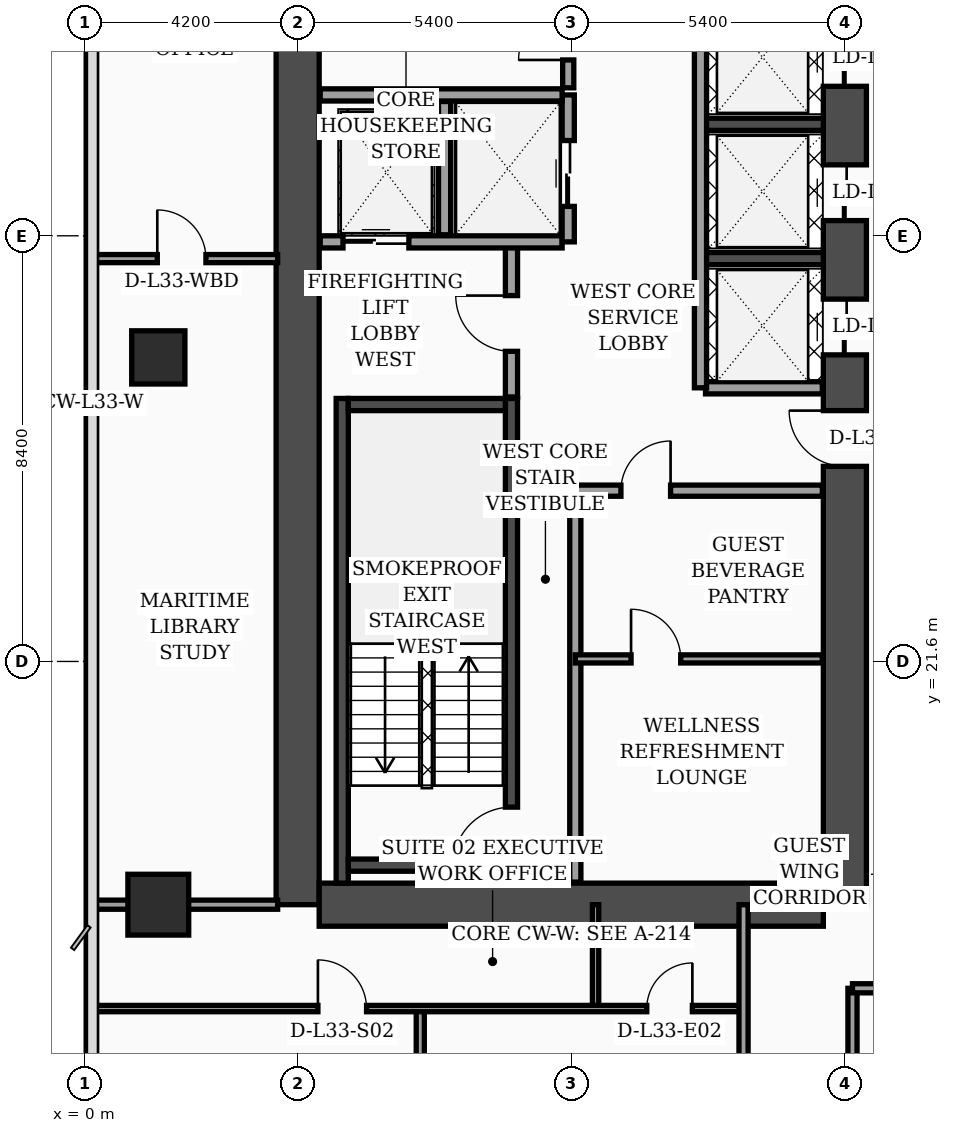
"""IFC4 building model, lengths in metres.
Left out: names, types, materials, properties, quantities, classifications, styles, units other than length and angle.
Written with IfcOpenShell. Run it as: python <this file> out.ifc"""

import sys

from ifc_helpers import new_model, si_unit, direction, frame, frame_2d, origin, origin_2d, place, context, subcontext, project, spatial, rectangle, extrude, element, fill, save


model = new_model("IFC4")
c1 = context("Model", 3, precision=1e-05, world=origin(), true_north=direction((0.0, 1.0)))
c2 = subcontext(c1, "Body", "Model", "MODEL_VIEW")
j1 = project(units=[si_unit("LENGTHUNIT", "METRE"), si_unit("PLANEANGLEUNIT", "RADIAN")], contexts=[c1])
p1 = place(None, origin())
s1 = spatial("IfcSite", under=j1, at=p1, CompositionType="ELEMENT")
p2 = place(p1, origin())
s2 = spatial("IfcBuilding", under=s1, at=p2, CompositionType="ELEMENT")
p3 = place(p2, frame((0.0, 0.0, 135.4)))
s3 = spatial("IfcBuildingStorey", under=s2, at=p3, CompositionType="ELEMENT", Elevation=135.4)
p4 = place(p3, frame((4.2, 16.8, 0.0), z_axis=(0.0, 0.0, 1.0), x_axis=(0.0, 1.0, 0.0)))
e1 = element("IfcWall", 1, at=p4, inside=s3, PredefinedType="SHEAR", context=c2, shape_type="SweptSolid", body=[
    extrude(rectangle(XDim=21.6, YDim=0.85, at=frame_2d((10.8, 0.0))), origin(), (0.0, 0.0, 1.0), 3.52),
])
p5 = place(p3, frame((15.0, 16.8, 0.0), z_axis=(0.0, 0.0, 1.0), x_axis=(0.0, 1.0, 0.0)))
e2 = element("IfcWall", 2, at=p5, inside=s3, PredefinedType="SHEAR", context=c2, shape_type="SweptSolid", body=[
    extrude(rectangle(XDim=21.6, YDim=0.85, at=frame_2d((10.8, 0.0))), origin(), (0.0, 0.0, 1.0), 3.52),
])
p6 = place(p5, frame((8.65, 0.0, 0.0)))
e3 = element("IfcOpeningElement", 3, at=p6, cuts=e2, PredefinedType="OPENING", context=c2, shape_type="SweptSolid", body=[
    extrude(rectangle(XDim=1.1, YDim=2.2, at=frame_2d((0.55, 1.1))), frame((0.0, 0.435, 0.0), z_axis=(0.0, -1.0, 0.0), x_axis=(1.0, 0.0, 0.0)), (0.0, 0.0, 1.0), 0.87),
])
p7 = place(p5, frame((10.85, 0.0, 0.0)))
e4 = element("IfcOpeningElement", 4, at=p7, cuts=e2, PredefinedType="OPENING", context=c2, shape_type="SweptSolid", body=[
    extrude(rectangle(XDim=1.1, YDim=2.2, at=frame_2d((0.55, 1.1))), frame((0.0, 0.435, 0.0), z_axis=(0.0, -1.0, 0.0), x_axis=(1.0, 0.0, 0.0)), (0.0, 0.0, 1.0), 0.87),
])
p8 = place(p5, frame((13.5, 0.0, 0.0)))
e5 = element("IfcOpeningElement", 5, at=p8, cuts=e2, PredefinedType="OPENING", context=c2, shape_type="SweptSolid", body=[
    extrude(rectangle(XDim=1.1, YDim=2.2, at=frame_2d((0.55, 1.1))), frame((0.0, 0.435, 0.0), z_axis=(0.0, -1.0, 0.0), x_axis=(1.0, 0.0, 0.0)), (0.0, 0.0, 1.0), 0.87),
])
p9 = place(p5, frame((16.15, 0.0, 0.0)))
e6 = element("IfcOpeningElement", 6, at=p9, cuts=e2, PredefinedType="OPENING", context=c2, shape_type="SweptSolid", body=[
    extrude(rectangle(XDim=1.1, YDim=2.2, at=frame_2d((0.55, 1.1))), frame((0.0, 0.435, 0.0), z_axis=(0.0, -1.0, 0.0), x_axis=(1.0, 0.0, 0.0)), (0.0, 0.0, 1.0), 0.87),
])
p10 = place(p3, frame((4.625, 16.8, 0.0), z_axis=(0.0, 0.0, 1.0), x_axis=(1.0, 0.0, 0.0)))
e7 = element("IfcWall", 7, at=p10, inside=s3, PredefinedType="SHEAR", context=c2, shape_type="SweptSolid", body=[
    extrude(rectangle(XDim=9.95, YDim=0.85, at=frame_2d((4.975, 0.0))), origin(), (0.0, 0.0, 1.0), 3.52),
])
p11 = place(p3, frame((5.08, 17.225, 0.0), z_axis=(0.0, 0.0, 1.0), x_axis=(0.0, 1.0, 0.0)))
e8 = element("IfcWall", 8, at=p11, inside=s3, PredefinedType="SOLIDWALL", context=c2, shape_type="SweptSolid", body=[
    extrude(rectangle(XDim=9.565, YDim=0.24, at=frame_2d((4.782, 0.0))), origin(), (0.0, 0.0, 1.0), 3.52),
])
p12 = place(p3, frame((8.42, 17.225, 0.0), z_axis=(0.0, 0.0, 1.0), x_axis=(0.0, 1.0, 0.0)))
e9 = element("IfcWall", 9, at=p12, inside=s3, PredefinedType="SOLIDWALL", context=c2, shape_type="SweptSolid", body=[
    extrude(rectangle(XDim=9.565, YDim=0.24, at=frame_2d((4.782, 0.0))), origin(), (0.0, 0.0, 1.0), 3.52),
])
p13 = place(p12, frame((0.35, 0.0, 0.0)))
e10 = element("IfcOpeningElement", 10, at=p13, cuts=e9, PredefinedType="OPENING", context=c2, shape_type="SweptSolid", body=[
    extrude(rectangle(XDim=1.15, YDim=2.2, at=frame_2d((0.575, 1.1))), frame((0.0, 0.13, 0.0), z_axis=(0.0, -1.0, 0.0), x_axis=(1.0, 0.0, 0.0)), (0.0, 0.0, 1.0), 0.26),
])
for number, where, z_axis, x_axis in (
    (11, (5.2, 17.58, 0.0), (0.0, 0.0, 1.0), (1.0, 0.0, 0.0)),
    (12, (5.2, 26.67, 0.0), (0.0, 0.0, 1.0), (1.0, 0.0, 0.0)),
):
    element("IfcWall", number, at=place(p3, frame(where, z_axis=z_axis, x_axis=x_axis)), inside=s3, PredefinedType="SOLIDWALL", context=c2, shape_type="SweptSolid", body=[
        extrude(rectangle(XDim=3.1, YDim=0.24, at=frame_2d((1.55, 0.0))), origin(), (0.0, 0.0, 1.0), 3.52),
    ])
for number, where, z_axis, x_axis in (
    (13, (12.18, 29.55, 0.0), (0.0, 0.0, 1.0), (1.0, 0.0, 0.0)),
    (14, (12.18, 32.2, 0.0), (0.0, 0.0, 1.0), (1.0, 0.0, 0.0)),
):
    element("IfcWall", number, at=place(p3, frame(where, z_axis=z_axis, x_axis=x_axis)), inside=s3, PredefinedType="SOLIDWALL", context=c2, shape_type="SweptSolid", body=[
        extrude(rectangle(XDim=2.395, YDim=0.24, at=frame_2d((1.198, 0.0))), origin(), (0.0, 0.0, 1.0), 3.52),
    ])
p14 = place(p3, frame((1.45, 16.8, 0.0), z_axis=(0.0, 0.0, 1.0), x_axis=(1.0, 0.0, 0.0)))
e15 = element("IfcColumn", 15, at=p14, inside=s3, PredefinedType="COLUMN", context=c2, shape_type="SweptSolid", body=[
    extrude(rectangle(XDim=1.2, YDim=1.2, at=origin_2d()), origin(), (0.0, 0.0, 1.0), 3.52),
])
p15 = place(p3, frame((1.45, 27.6, 0.0), z_axis=(0.0, 0.0, 1.0), x_axis=(1.0, 0.0, 0.0)))
e16 = element("IfcColumn", 16, at=p15, inside=s3, PredefinedType="COLUMN", context=c2, shape_type="SweptSolid", body=[
    extrude(rectangle(XDim=1.05, YDim=1.05, at=origin_2d()), origin(), (0.0, 0.0, 1.0), 3.52),
])
p16 = place(p3, frame((8.42, 26.82, 0.0), z_axis=(0.0, 0.0, 1.0), x_axis=(0.0, 1.0, 0.0)))
e17 = element("IfcWall", 17, at=p16, inside=s3, PredefinedType="SOLIDWALL", context=c2, shape_type="SweptSolid", body=[
    extrude(rectangle(XDim=3.0, YDim=0.24, at=frame_2d((1.5, 0.0))), origin(), (0.0, 0.0, 1.0), 3.52),
])
p17 = place(p16, frame((0.9, 0.0, 0.0)))
e18 = element("IfcOpeningElement", 18, at=p17, cuts=e17, PredefinedType="OPENING", context=c2, shape_type="SweptSolid", body=[
    extrude(rectangle(XDim=1.1, YDim=2.2, at=frame_2d((0.55, 1.1))), frame((0.0, 0.13, 0.0), z_axis=(0.0, -1.0, 0.0), x_axis=(1.0, 0.0, 0.0)), (0.0, 0.0, 1.0), 0.26),
])
p18 = place(p3, frame((4.645, 29.88, 0.0), z_axis=(0.0, 0.0, 1.0), x_axis=(1.0, 0.0, 0.0)))
e19 = element("IfcWall", 19, at=p18, inside=s3, PredefinedType="SOLIDWALL", context=c2, shape_type="SweptSolid", body=[
    extrude(rectangle(XDim=4.775, YDim=0.24, at=frame_2d((2.387, 0.0))), origin(), (0.0, 0.0, 1.0), 3.52),
])
p19 = place(p18, frame((0.45, 0.0, 0.0)))
e20 = element("IfcOpeningElement", 20, at=p19, cuts=e19, PredefinedType="OPENING", context=c2, shape_type="SweptSolid", body=[
    extrude(rectangle(XDim=1.3, YDim=2.35, at=frame_2d((0.65, 1.175))), frame((0.0, 0.13, 0.0), z_axis=(0.0, -1.0, 0.0), x_axis=(1.0, 0.0, 0.0)), (0.0, 0.0, 1.0), 0.26),
])
p20 = place(p3, frame((7.1, 30.02, 0.0), z_axis=(0.0, 0.0, 1.0), x_axis=(0.0, 1.0, 0.0)))
e21 = element("IfcWall", 21, at=p20, inside=s3, PredefinedType="SOLIDWALL", context=c2, shape_type="SweptSolid", body=[
    extrude(rectangle(XDim=2.63, YDim=0.24, at=frame_2d((1.315, 0.0))), origin(), (0.0, 0.0, 1.0), 3.52),
])
p21 = place(p3, frame((9.54, 29.88, 0.0), z_axis=(0.0, 0.0, 1.0), x_axis=(0.0, 1.0, 0.0)))
e22 = element("IfcWall", 22, at=p21, inside=s3, PredefinedType="SOLIDWALL", context=c2, shape_type="SweptSolid", body=[
    extrude(rectangle(XDim=2.9, YDim=0.24, at=frame_2d((1.45, 0.0))), origin(), (0.0, 0.0, 1.0), 3.52),
])
p22 = place(p21, frame((0.7, 0.0, 0.0)))
e23 = element("IfcOpeningElement", 23, at=p22, cuts=e22, PredefinedType="OPENING", context=c2, shape_type="SweptSolid", body=[
    extrude(rectangle(XDim=1.3, YDim=2.35, at=frame_2d((0.65, 1.175))), frame((0.0, 0.13, 0.0), z_axis=(0.0, -1.0, 0.0), x_axis=(1.0, 0.0, 0.0)), (0.0, 0.0, 1.0), 0.26),
])
p23 = place(p3, frame((4.645, 32.78, 0.0), z_axis=(0.0, 0.0, 1.0), x_axis=(1.0, 0.0, 0.0)))
e24 = element("IfcWall", 24, at=p23, inside=s3, PredefinedType="SOLIDWALL", context=c2, shape_type="SweptSolid", body=[
    extrude(rectangle(XDim=4.775, YDim=0.24, at=frame_2d((2.387, 0.0))), origin(), (0.0, 0.0, 1.0), 3.17),
])
p24 = place(p3, frame((9.68, 17.245, 0.0), z_axis=(0.0, 0.0, 1.0), x_axis=(0.0, 1.0, 0.0)))
e25 = element("IfcWall", 25, at=p24, inside=s3, PredefinedType="SOLIDWALL", context=c2, shape_type="SweptSolid", body=[
    extrude(rectangle(XDim=7.755, YDim=0.22, at=frame_2d((3.877, 0.0))), origin(), (0.0, 0.0, 1.0), 3.52),
])
p25 = place(p3, frame((9.54, 32.92, 0.0), z_axis=(0.0, 0.0, 1.0), x_axis=(0.0, 1.0, 0.0)))
e26 = element("IfcWall", 26, at=p25, inside=s3, PredefinedType="SOLIDWALL", context=c2, shape_type="SweptSolid", body=[
    extrude(rectangle(XDim=5.035, YDim=0.22, at=frame_2d((2.518, 0.0))), origin(), (0.0, 0.0, 1.0), 3.52),
])
p26 = place(p25, frame((0.55, 0.0, 0.0)))
e27 = element("IfcOpeningElement", 27, at=p26, cuts=e26, PredefinedType="OPENING", context=c2, shape_type="SweptSolid", body=[
    extrude(rectangle(XDim=0.98, YDim=2.15, at=frame_2d((0.49, 1.075))), frame((0.0, 0.12, 0.0), z_axis=(0.0, -1.0, 0.0), x_axis=(1.0, 0.0, 0.0)), (0.0, 0.0, 1.0), 0.24),
])
p27 = place(p3, frame((9.68, 21.65, 0.0), z_axis=(0.0, 0.0, 1.0), x_axis=(1.0, 0.0, 0.0)))
e28 = element("IfcWall", 28, at=p27, inside=s3, PredefinedType="PARTITIONING", context=c2, shape_type="SweptSolid", body=[
    extrude(rectangle(XDim=4.875, YDim=0.16, at=frame_2d((2.438, 0.0))), origin(), (0.0, 0.0, 1.0), 3.52),
])
p28 = place(p27, frame((1.1, 0.0, 0.0)))
e29 = element("IfcOpeningElement", 29, at=p28, cuts=e28, PredefinedType="OPENING", context=c2, shape_type="SweptSolid", body=[
    extrude(rectangle(XDim=0.98, YDim=2.15, at=frame_2d((0.49, 1.075))), frame((0.0, 0.09, 0.0), z_axis=(0.0, -1.0, 0.0), x_axis=(1.0, 0.0, 0.0)), (0.0, 0.0, 1.0), 0.18),
])
p29 = place(p3, frame((9.68, 24.97, 0.0), z_axis=(0.0, 0.0, 1.0), x_axis=(1.0, 0.0, 0.0)))
e30 = element("IfcWall", 30, at=p29, inside=s3, PredefinedType="SOLIDWALL", context=c2, shape_type="SweptSolid", body=[
    extrude(rectangle(XDim=4.875, YDim=0.22, at=frame_2d((2.438, 0.0))), origin(), (0.0, 0.0, 1.0), 2.82),
])
p30 = place(p29, frame((0.9, 0.0, 0.0)))
e31 = element("IfcOpeningElement", 31, at=p30, cuts=e30, PredefinedType="OPENING", context=c2, shape_type="SweptSolid", body=[
    extrude(rectangle(XDim=0.98, YDim=2.15, at=frame_2d((0.49, 1.075))), frame((0.0, 0.12, 0.0), z_axis=(0.0, -1.0, 0.0), x_axis=(1.0, 0.0, 0.0)), (0.0, 0.0, 1.0), 0.24),
])
p31 = place(p3, frame((12.25, 27.0, 0.0), z_axis=(0.0, 0.0, 1.0), x_axis=(1.0, 0.0, 0.0)))
e32 = element("IfcWall", 32, at=p31, inside=s3, PredefinedType="SOLIDWALL", context=c2, shape_type="SweptSolid", body=[
    extrude(rectangle(XDim=2.305, YDim=0.24, at=frame_2d((1.152, 0.0))), origin(), (0.0, 0.0, 1.0), 3.52),
])
p32 = place(p3, frame((12.15, 27.0, 0.0), z_axis=(0.0, 0.0, 1.0), x_axis=(0.0, 1.0, 0.0)))
e33 = element("IfcWall", 33, at=p32, inside=s3, PredefinedType="SOLIDWALL", context=c2, shape_type="SweptSolid", body=[
    extrude(rectangle(XDim=7.75, YDim=0.24, at=frame_2d((3.875, 0.0))), origin(), (0.0, 0.0, 1.0), 3.52),
])
p33 = place(p3, frame((0.08, 29.55, 0.0), z_axis=(0.0, 0.0, 1.0), x_axis=(1.0, 0.0, 0.0)))
e34 = element("IfcWall", 34, at=p33, inside=s3, PredefinedType="PARTITIONING", context=c2, shape_type="SweptSolid", body=[
    extrude(rectangle(XDim=3.725, YDim=0.16, at=frame_2d((1.862, 0.0))), origin(), (0.0, 0.0, 1.0), 3.02),
])
p34 = place(p33, frame((1.35, 0.0, 0.0)))
e35 = element("IfcOpeningElement", 35, at=p34, cuts=e34, PredefinedType="OPENING", context=c2, shape_type="SweptSolid", body=[
    extrude(rectangle(XDim=0.96, YDim=2.2, at=frame_2d((0.48, 1.1))), frame((0.0, 0.09, 0.0), z_axis=(0.0, -1.0, 0.0), x_axis=(1.0, 0.0, 0.0)), (0.0, 0.0, 1.0), 0.18),
])
p35 = place(p3, frame((0.08, 16.8, 0.0), z_axis=(0.0, 0.0, 1.0), x_axis=(1.0, 0.0, 0.0)))
e36 = element("IfcWall", 36, at=p35, inside=s3, PredefinedType="PARTITIONING", context=c2, shape_type="SweptSolid", body=[
    extrude(rectangle(XDim=3.725, YDim=0.18, at=frame_2d((1.862, 0.0))), origin(), (0.0, 0.0, 1.0), 2.82),
])
p36 = place(p3, frame((10.08, 14.75, 0.0), z_axis=(0.0, 0.0, 1.0), x_axis=(0.0, 1.0, 0.0)))
e37 = element("IfcWall", 37, at=p36, inside=s3, PredefinedType="PARTITIONING", context=c2, shape_type="SweptSolid", body=[
    extrude(rectangle(XDim=2.05, YDim=0.125, at=frame_2d((1.025, 0.0))), origin(), (0.0, 0.0, 1.0), 3.52),
])
p37 = place(p3, frame((6.62, 10.2, 0.0), z_axis=(0.0, 0.0, 1.0), x_axis=(0.0, 1.0, 0.0)))
e38 = element("IfcWall", 38, at=p37, inside=s3, PredefinedType="PARTITIONING", context=c2, shape_type="SweptSolid", body=[
    extrude(rectangle(XDim=4.55, YDim=0.16, at=frame_2d((2.275, 0.0))), origin(), (0.0, 0.0, 1.0), 3.12),
])
p38 = place(p37, frame((1.8, 0.0, 0.0)))
e39 = element("IfcOpeningElement", 39, at=p38, cuts=e38, PredefinedType="OPENING", context=c2, shape_type="SweptSolid", body=[
    extrude(rectangle(XDim=0.96, YDim=2.2, at=frame_2d((0.48, 1.1))), frame((0.0, 0.09, 0.0), z_axis=(0.0, -1.0, 0.0), x_axis=(1.0, 0.0, 0.0)), (0.0, 0.0, 1.0), 0.18),
])
p39 = place(p3, frame((0.08, 14.75, 0.0), z_axis=(0.0, 0.0, 1.0), x_axis=(1.0, 0.0, 0.0)))
e40 = element("IfcWall", 40, at=p39, inside=s3, PredefinedType="PARTITIONING", context=c2, shape_type="SweptSolid", body=[
    extrude(rectangle(XDim=12.92, YDim=0.125, at=frame_2d((6.46, 0.0))), origin(), (0.0, 0.0, 1.0), 2.82),
])
p40 = place(p39, frame((4.52, 0.0, 0.0)))
e41 = element("IfcOpeningElement", 41, at=p40, cuts=e40, PredefinedType="OPENING", context=c2, shape_type="SweptSolid", body=[
    extrude(rectangle(XDim=0.96, YDim=2.2, at=frame_2d((0.48, 1.1))), frame((0.0, 0.073, 0.0), z_axis=(0.0, -1.0, 0.0), x_axis=(1.0, 0.0, 0.0)), (0.0, 0.0, 1.0), 0.145),
])
p41 = place(p39, frame((11.01, 0.0, 0.0)))
e42 = element("IfcOpeningElement", 42, at=p41, cuts=e40, PredefinedType="OPENING", context=c2, shape_type="SweptSolid", body=[
    extrude(rectangle(XDim=0.9, YDim=2.15, at=frame_2d((0.45, 1.075))), frame((0.0, 0.073, 0.0), z_axis=(0.0, -1.0, 0.0), x_axis=(1.0, 0.0, 0.0)), (0.0, 0.0, 1.0), 0.145),
])
p42 = place(p3, frame((13.0, 2.44, 0.0), z_axis=(0.0, 0.0, 1.0), x_axis=(0.0, 1.0, 0.0)))
e43 = element("IfcWall", 43, at=p42, inside=s3, PredefinedType="PARTITIONING", context=c2, shape_type="SweptSolid", body=[
    extrude(rectangle(XDim=14.36, YDim=0.18, at=frame_2d((7.18, 0.0))), origin(), (0.0, 0.0, 1.0), 2.82),
])
p43 = place(p42, frame((3.01, 0.0, 0.0)))
e44 = element("IfcOpeningElement", 44, at=p43, cuts=e43, PredefinedType="OPENING", context=c2, shape_type="SweptSolid", body=[
    extrude(rectangle(XDim=1.02, YDim=2.2, at=frame_2d((0.51, 1.1))), frame((0.0, 0.1, 0.0), z_axis=(0.0, -1.0, 0.0), x_axis=(1.0, 0.0, 0.0)), (0.0, 0.0, 1.0), 0.2),
])
p44 = place(p42, frame((9.52, 0.0, 0.0)))
e45 = element("IfcOpeningElement", 45, at=p44, cuts=e43, PredefinedType="OPENING", context=c2, shape_type="SweptSolid", body=[
    extrude(rectangle(XDim=1.02, YDim=2.2, at=frame_2d((0.51, 1.1))), frame((0.0, 0.1, 0.0), z_axis=(0.0, -1.0, 0.0), x_axis=(1.0, 0.0, 0.0)), (0.0, 0.0, 1.0), 0.2),
])
p45 = place(p3, frame((15.15, 2.44, 0.0), z_axis=(0.0, 0.0, 1.0), x_axis=(0.0, 1.0, 0.0)))
e46 = element("IfcWall", 46, at=p45, inside=s3, PredefinedType="PARTITIONING", context=c2, shape_type="SweptSolid", body=[
    extrude(rectangle(XDim=12.71, YDim=0.18, at=frame_2d((6.355, 0.0))), origin(), (0.0, 0.0, 1.0), 3.02),
])
p46 = place(p3, frame((15.15, 15.15, 0.0), z_axis=(0.0, 0.0, 1.0), x_axis=(1.0, 0.0, 0.0)))
e47 = element("IfcWall", 47, at=p46, inside=s3, PredefinedType="PARTITIONING", context=c2, shape_type="SweptSolid", body=[
    extrude(rectangle(XDim=6.45, YDim=0.18, at=frame_2d((3.225, 0.0))), origin(), (0.0, 0.0, 1.0), 2.47),
])
p47 = place(p46, frame((1.74, 0.0, 0.0)))
e48 = element("IfcOpeningElement", 48, at=p47, cuts=e47, PredefinedType="OPENING", context=c2, shape_type="SweptSolid", body=[
    extrude(rectangle(XDim=1.02, YDim=2.2, at=frame_2d((0.51, 1.1))), frame((0.0, 0.1, 0.0), z_axis=(0.0, -1.0, 0.0), x_axis=(1.0, 0.0, 0.0)), (0.0, 0.0, 1.0), 0.2),
])
p48 = place(p17, origin())
e49 = element("IfcDoor", 49, at=p48, inside=s3, OperationType="SINGLE_SWING_RIGHT", PredefinedType="DOOR", context=c2, shape_type="SweptSolid", body=[
    extrude(rectangle(XDim=1.1, YDim=2.2, at=frame_2d((0.55, 1.1))), frame((0.0, 0.025, 0.0), z_axis=(0.0, -1.0, 0.0), x_axis=(1.0, 0.0, 0.0)), (0.0, 0.0, 1.0), 0.05),
])
fill(e18, e49)
p49 = place(p19, origin())
e50 = element("IfcDoor", 50, at=p49, inside=s3, OperationType="DOUBLE_DOOR_SLIDING", PredefinedType="DOOR", context=c2, shape_type="SweptSolid", body=[
    extrude(rectangle(XDim=1.3, YDim=2.35, at=frame_2d((0.65, 1.175))), frame((0.0, 0.025, 0.0), z_axis=(0.0, -1.0, 0.0), x_axis=(1.0, 0.0, 0.0)), (0.0, 0.0, 1.0), 0.05),
])
fill(e20, e50)
p50 = place(p22, origin())
e51 = element("IfcDoor", 51, at=p50, inside=s3, OperationType="DOUBLE_DOOR_SLIDING", PredefinedType="DOOR", context=c2, shape_type="SweptSolid", body=[
    extrude(rectangle(XDim=1.3, YDim=2.35, at=frame_2d((0.65, 1.175))), frame((0.0, 0.025, 0.0), z_axis=(0.0, -1.0, 0.0), x_axis=(1.0, 0.0, 0.0)), (0.0, 0.0, 1.0), 0.05),
])
fill(e23, e51)
p51 = place(p26, origin())
e52 = element("IfcDoor", 52, at=p51, inside=s3, OperationType="SINGLE_SWING_LEFT", PredefinedType="DOOR", context=c2, shape_type="SweptSolid", body=[
    extrude(rectangle(XDim=0.98, YDim=2.15, at=frame_2d((0.49, 1.075))), frame((0.0, 0.025, 0.0), z_axis=(0.0, -1.0, 0.0), x_axis=(1.0, 0.0, 0.0)), (0.0, 0.0, 1.0), 0.05),
])
fill(e27, e52)
p52 = place(p28, origin())
e53 = element("IfcDoor", 53, at=p52, inside=s3, OperationType="SINGLE_SWING_LEFT", PredefinedType="DOOR", context=c2, shape_type="SweptSolid", body=[
    extrude(rectangle(XDim=0.98, YDim=2.15, at=frame_2d((0.49, 1.075))), frame((0.0, 0.025, 0.0), z_axis=(0.0, -1.0, 0.0), x_axis=(1.0, 0.0, 0.0)), (0.0, 0.0, 1.0), 0.05),
])
fill(e29, e53)
p53 = place(p30, origin())
e54 = element("IfcDoor", 54, at=p53, inside=s3, OperationType="SINGLE_SWING_RIGHT", PredefinedType="DOOR", context=c2, shape_type="SweptSolid", body=[
    extrude(rectangle(XDim=0.98, YDim=2.15, at=frame_2d((0.49, 1.075))), frame((0.0, 0.025, 0.0), z_axis=(0.0, -1.0, 0.0), x_axis=(1.0, 0.0, 0.0)), (0.0, 0.0, 1.0), 0.05),
])
fill(e31, e54)
p54 = place(p34, origin())
e55 = element("IfcDoor", 55, at=p54, inside=s3, OperationType="SINGLE_SWING_LEFT", PredefinedType="DOOR", context=c2, shape_type="SweptSolid", body=[
    extrude(rectangle(XDim=0.96, YDim=2.2, at=frame_2d((0.48, 1.1))), frame((0.0, 0.025, 0.0), z_axis=(0.0, -1.0, 0.0), x_axis=(1.0, 0.0, 0.0)), (0.0, 0.0, 1.0), 0.05),
])
fill(e35, e55)
p55 = place(p40, origin())
e56 = element("IfcDoor", 56, at=p55, inside=s3, OperationType="SINGLE_SWING_LEFT", PredefinedType="DOOR", context=c2, shape_type="SweptSolid", body=[
    extrude(rectangle(XDim=0.96, YDim=2.2, at=frame_2d((0.48, 1.1))), frame((0.0, 0.025, 0.0), z_axis=(0.0, -1.0, 0.0), x_axis=(1.0, 0.0, 0.0)), (0.0, 0.0, 1.0), 0.05),
])
fill(e41, e56)
p56 = place(p41, origin())
e57 = element("IfcDoor", 57, at=p56, inside=s3, OperationType="SINGLE_SWING_RIGHT", PredefinedType="DOOR", context=c2, shape_type="SweptSolid", body=[
    extrude(rectangle(XDim=0.9, YDim=2.15, at=frame_2d((0.45, 1.075))), frame((0.0, 0.025, 0.0), z_axis=(0.0, -1.0, 0.0), x_axis=(1.0, 0.0, 0.0)), (0.0, 0.0, 1.0), 0.05),
])
fill(e42, e57)
p57 = place(p13, origin())
e58 = element("IfcDoor", 58, at=p57, inside=s3, OperationType="SINGLE_SWING_LEFT", PredefinedType="DOOR", context=c2, shape_type="SweptSolid", body=[
    extrude(rectangle(XDim=1.15, YDim=2.2, at=frame_2d((0.575, 1.1))), frame((0.0, 0.025, 0.0), z_axis=(0.0, -1.0, 0.0), x_axis=(1.0, 0.0, 0.0)), (0.0, 0.0, 1.0), 0.05),
])
fill(e10, e58)
p58 = place(p6, origin())
e59 = element("IfcDoor", 59, at=p58, inside=s3, OperationType="SINGLE_SWING_RIGHT", PredefinedType="DOOR", context=c2, shape_type="SweptSolid", body=[
    extrude(rectangle(XDim=1.1, YDim=2.2, at=frame_2d((0.55, 1.1))), frame((0.0, 0.025, 0.0), z_axis=(0.0, -1.0, 0.0), x_axis=(1.0, 0.0, 0.0)), (0.0, 0.0, 1.0), 0.05),
])
fill(e3, e59)
p59 = place(p7, origin())
e60 = element("IfcDoor", 60, at=p59, inside=s3, OperationType="DOUBLE_DOOR_SLIDING", PredefinedType="DOOR", context=c2, shape_type="SweptSolid", body=[
    extrude(rectangle(XDim=1.1, YDim=2.2, at=frame_2d((0.55, 1.1))), frame((0.0, 0.025, 0.0), z_axis=(0.0, -1.0, 0.0), x_axis=(1.0, 0.0, 0.0)), (0.0, 0.0, 1.0), 0.05),
])
fill(e4, e60)
p60 = place(p8, origin())
e61 = element("IfcDoor", 61, at=p60, inside=s3, OperationType="DOUBLE_DOOR_SLIDING", PredefinedType="DOOR", context=c2, shape_type="SweptSolid", body=[
    extrude(rectangle(XDim=1.1, YDim=2.2, at=frame_2d((0.55, 1.1))), frame((0.0, 0.025, 0.0), z_axis=(0.0, -1.0, 0.0), x_axis=(1.0, 0.0, 0.0)), (0.0, 0.0, 1.0), 0.05),
])
fill(e5, e61)
p61 = place(p9, origin())
e62 = element("IfcDoor", 62, at=p61, inside=s3, OperationType="DOUBLE_DOOR_SLIDING", PredefinedType="DOOR", context=c2, shape_type="SweptSolid", body=[
    extrude(rectangle(XDim=1.1, YDim=2.2, at=frame_2d((0.55, 1.1))), frame((0.0, 0.025, 0.0), z_axis=(0.0, -1.0, 0.0), x_axis=(1.0, 0.0, 0.0)), (0.0, 0.0, 1.0), 0.05),
])
fill(e6, e62)
save(model, sys.argv[1])
